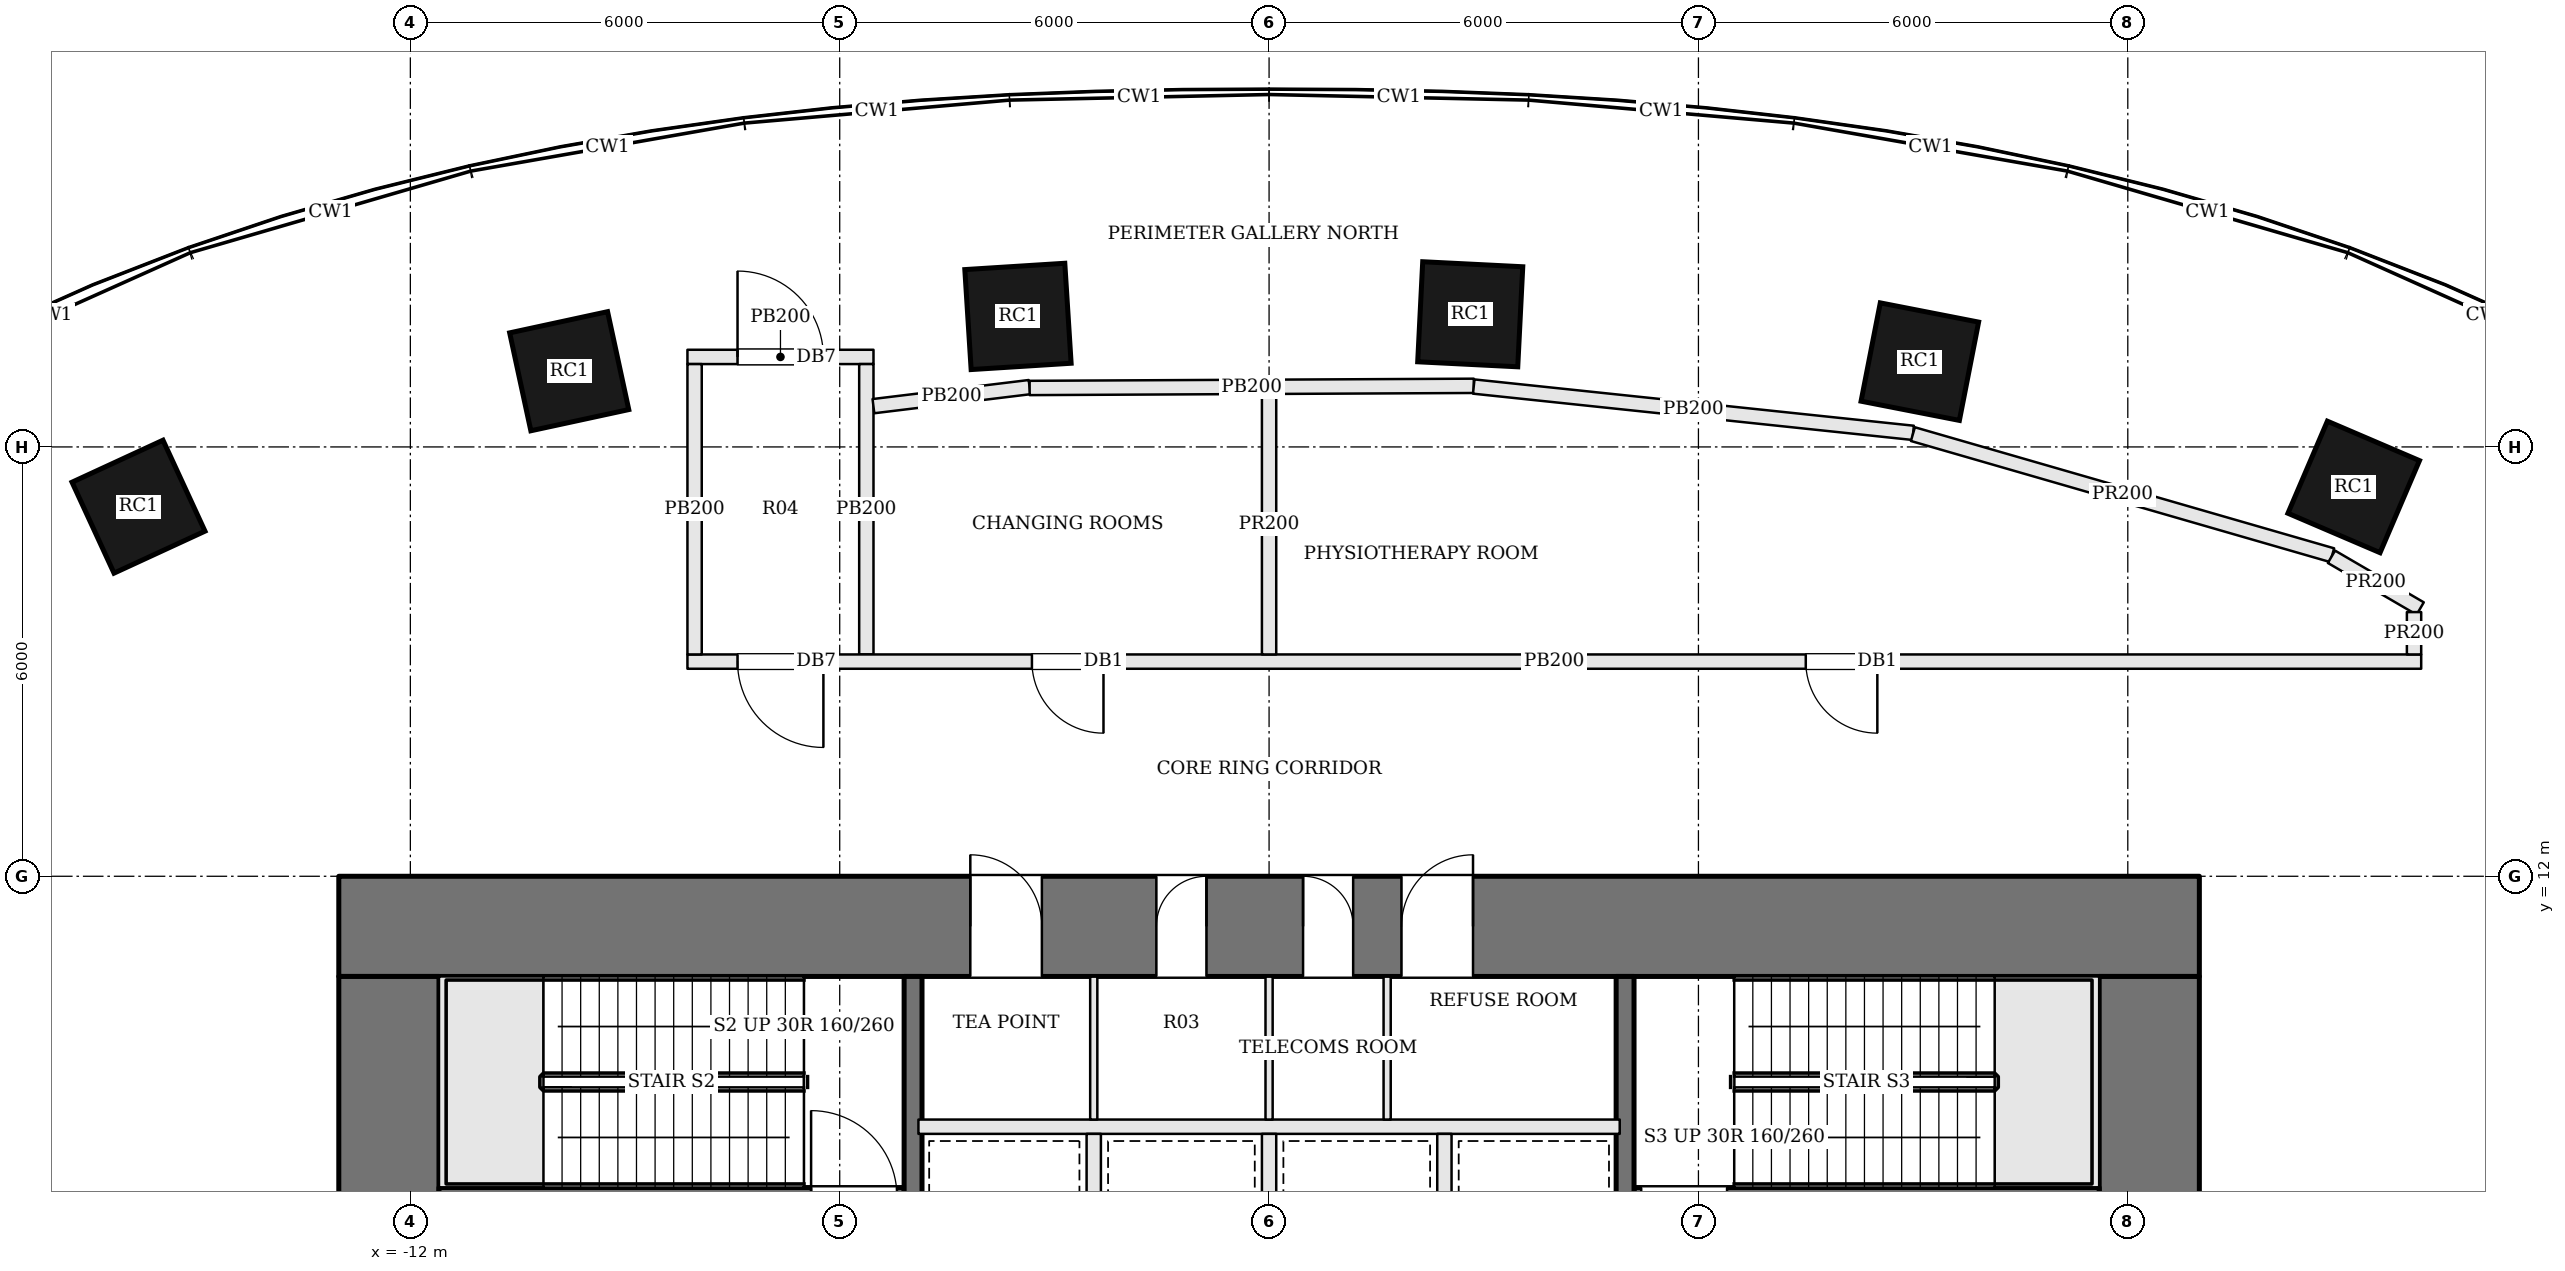
"""IFC4 building model, lengths in metres.
Left out: names, types, materials, properties, quantities, classifications, styles, units other than length and angle.
Written with IfcOpenShell. Run it as: python <this file> out.ifc"""

import sys

from ifc_helpers import new_model, si_unit, direction, frame, frame_2d, origin, origin_2d, place, context, subcontext, project, spatial, rectangle, extrude, element, fill, save


model = new_model("IFC4")
c1 = context("Model", 3, precision=1e-05, world=origin(), true_north=direction((0.0, 1.0)))
c2 = subcontext(c1, "Body", "Model", "MODEL_VIEW")
j1 = project(units=[si_unit("LENGTHUNIT", "METRE"), si_unit("PLANEANGLEUNIT", "RADIAN")], contexts=[c1])
p1 = place(None, origin())
s1 = spatial("IfcSite", under=j1, at=p1, CompositionType="ELEMENT")
p2 = place(p1, origin())
s2 = spatial("IfcBuilding", under=s1, at=p2, CompositionType="ELEMENT")
p3 = place(p2, frame((0.0, 0.0, 28.2)))
s3 = spatial("IfcBuildingStorey", under=s2, at=p3, CompositionType="ELEMENT", Elevation=28.2)
p4 = place(p3, frame((-13.0, 11.3, 0.0), z_axis=(0.0, 0.0, 1.0), x_axis=(1.0, 0.0, 0.0)))
e1 = element("IfcWall", 1, at=p4, inside=s3, PredefinedType="SHEAR", context=c2, shape_type="SweptSolid", body=[
    extrude(rectangle(XDim=26.0, YDim=1.4, at=frame_2d((13.0, 0.0))), origin(), (0.0, 0.0, 1.0), 4.8),
])
p5 = place(p4, frame((8.825, 0.0, 0.0)))
e2 = element("IfcOpeningElement", 2, at=p5, cuts=e1, PredefinedType="OPENING", context=c2, shape_type="SweptSolid", body=[
    extrude(rectangle(XDim=1.0, YDim=2.1, at=frame_2d((0.5, 1.05))), frame((0.0, 0.71, 0.0), z_axis=(0.0, -1.0, 0.0), x_axis=(1.0, 0.0, 0.0)), (0.0, 0.0, 1.0), 1.42),
])
p6 = place(p4, frame((11.425, 0.0, 0.0)))
e3 = element("IfcOpeningElement", 3, at=p6, cuts=e1, PredefinedType="OPENING", context=c2, shape_type="SweptSolid", body=[
    extrude(rectangle(XDim=0.7, YDim=2.1, at=frame_2d((0.35, 1.05))), frame((0.0, 0.71, 0.0), z_axis=(0.0, -1.0, 0.0), x_axis=(1.0, 0.0, 0.0)), (0.0, 0.0, 1.0), 1.42),
])
p7 = place(p4, frame((13.475, 0.0, 0.0)))
e4 = element("IfcOpeningElement", 4, at=p7, cuts=e1, PredefinedType="OPENING", context=c2, shape_type="SweptSolid", body=[
    extrude(rectangle(XDim=0.7, YDim=2.1, at=frame_2d((0.35, 1.05))), frame((0.0, 0.71, 0.0), z_axis=(0.0, -1.0, 0.0), x_axis=(1.0, 0.0, 0.0)), (0.0, 0.0, 1.0), 1.42),
])
p8 = place(p4, frame((14.85, 0.0, 0.0)))
e5 = element("IfcOpeningElement", 5, at=p8, cuts=e1, PredefinedType="OPENING", context=c2, shape_type="SweptSolid", body=[
    extrude(rectangle(XDim=1.0, YDim=2.1, at=frame_2d((0.5, 1.05))), frame((0.0, 0.71, 0.0), z_axis=(0.0, -1.0, 0.0), x_axis=(1.0, 0.0, 0.0)), (0.0, 0.0, 1.0), 1.42),
])
p9 = place(p3, frame((12.3, -1.6, 0.0), z_axis=(0.0, 0.0, 1.0), x_axis=(0.0, 1.0, 0.0)))
e6 = element("IfcWall", 6, at=p9, inside=s3, PredefinedType="SHEAR", context=c2, shape_type="SweptSolid", body=[
    extrude(rectangle(XDim=12.2, YDim=1.4, at=frame_2d((6.1, 0.0))), origin(), (0.0, 0.0, 1.0), 4.8),
])
p10 = place(p9, frame((6.8, 0.0, 0.0)))
e7 = element("IfcOpeningElement", 7, at=p10, cuts=e6, PredefinedType="OPENING", context=c2, shape_type="SweptSolid", body=[
    extrude(rectangle(XDim=1.8, YDim=2.1, at=frame_2d((0.9, 1.05))), frame((0.0, 0.71, 0.0), z_axis=(0.0, -1.0, 0.0), x_axis=(1.0, 0.0, 0.0)), (0.0, 0.0, 1.0), 1.42),
])
p11 = place(p3, frame((-12.3, -1.6, 0.0), z_axis=(0.0, 0.0, 1.0), x_axis=(0.0, 1.0, 0.0)))
e8 = element("IfcWall", 8, at=p11, inside=s3, PredefinedType="SHEAR", context=c2, shape_type="SweptSolid", body=[
    extrude(rectangle(XDim=12.2, YDim=1.4, at=frame_2d((6.1, 0.0))), origin(), (0.0, 0.0, 1.0), 4.8),
])
p12 = place(p11, frame((3.6, 0.0, 0.0)))
e9 = element("IfcOpeningElement", 9, at=p12, cuts=e8, PredefinedType="OPENING", context=c2, shape_type="SweptSolid", body=[
    extrude(rectangle(XDim=1.8, YDim=2.1, at=frame_2d((0.9, 1.05))), frame((0.0, 0.71, 0.0), z_axis=(0.0, -1.0, 0.0), x_axis=(1.0, 0.0, 0.0)), (0.0, 0.0, 1.0), 1.42),
])
for number, where, z_axis, x_axis in (
    (10, (15.157, 17.441, 0.0), (0.0, 0.0, 1.0), (-0.919, 0.394, 0.0)),
    (11, (9.094, 19.192, 0.0), (0.0, 0.0, 1.0), (-0.981, 0.192, 0.0)),
    (12, (2.811, 19.854, 0.0), (0.0, 0.0, 1.0), (-0.999, 0.05, 0.0)),
    (13, (-3.509, 19.824, 0.0), (0.0, 0.0, 1.0), (-0.998, -0.063, 0.0)),
    (14, (-9.78, 19.058, 0.0), (0.0, 0.0, 1.0), (-0.977, -0.211, 0.0)),
    (15, (-15.799, 17.165, 0.0), (0.0, 0.0, 1.0), (-0.908, -0.419, 0.0)),
):
    element("IfcColumn", number, at=place(p3, frame(where, z_axis=z_axis, x_axis=x_axis)), inside=s3, PredefinedType="COLUMN", context=c2, shape_type="SweptSolid", body=[
        extrude(rectangle(XDim=1.4, YDim=1.4, at=origin_2d()), origin(), (0.0, 0.0, 1.0), 4.8),
    ])
p13 = place(p3, frame((11.6, 7.525, 0.0), z_axis=(0.0, 0.0, 1.0), x_axis=(-1.0, 0.0, 0.0)))
e16 = element("IfcWall", 16, at=p13, inside=s3, PredefinedType="SOLIDWALL", context=c2, shape_type="SweptSolid", body=[
    extrude(rectangle(XDim=6.5, YDim=0.25, at=frame_2d((3.25, 0.0))), origin(), (0.0, 0.0, 1.0), 4.5),
])
p14 = place(p13, frame((5.2, 0.0, 0.0)))
e17 = element("IfcOpeningElement", 17, at=p14, cuts=e16, PredefinedType="OPENING", context=c2, shape_type="SweptSolid", body=[
    extrude(rectangle(XDim=1.2, YDim=2.1, at=frame_2d((0.6, 1.05))), frame((0.0, 0.135, 0.0), z_axis=(0.0, -1.0, 0.0), x_axis=(1.0, 0.0, 0.0)), (0.0, 0.0, 1.0), 0.27),
])
p15 = place(p3, frame((-11.6, 7.525, 0.0), z_axis=(0.0, 0.0, 1.0), x_axis=(1.0, 0.0, 0.0)))
e18 = element("IfcWall", 18, at=p15, inside=s3, PredefinedType="SOLIDWALL", context=c2, shape_type="SweptSolid", body=[
    extrude(rectangle(XDim=6.5, YDim=0.25, at=frame_2d((3.25, 0.0))), origin(), (0.0, 0.0, 1.0), 4.5),
])
p16 = place(p15, frame((5.2, 0.0, 0.0)))
e19 = element("IfcOpeningElement", 19, at=p16, cuts=e18, PredefinedType="OPENING", context=c2, shape_type="SweptSolid", body=[
    extrude(rectangle(XDim=1.2, YDim=2.1, at=frame_2d((0.6, 1.05))), frame((0.0, 0.135, 0.0), z_axis=(0.0, -1.0, 0.0), x_axis=(1.0, 0.0, 0.0)), (0.0, 0.0, 1.0), 0.27),
])
p17 = place(p3, frame((-4.975, -1.6, 0.0), z_axis=(0.0, 0.0, 1.0), x_axis=(0.0, 1.0, 0.0)))
e20 = element("IfcWall", 20, at=p17, inside=s3, PredefinedType="SOLIDWALL", context=c2, shape_type="SweptSolid", body=[
    extrude(rectangle(XDim=12.2, YDim=0.25, at=frame_2d((6.1, 0.0))), origin(), (0.0, 0.0, 1.0), 4.5),
])
p18 = place(p17, frame((4.65, 0.0, 0.0)))
e21 = element("IfcOpeningElement", 21, at=p18, cuts=e20, PredefinedType="OPENING", context=c2, shape_type="SweptSolid", body=[
    extrude(rectangle(XDim=1.2, YDim=2.1, at=frame_2d((0.6, 1.05))), frame((0.0, 0.135, 0.0), z_axis=(0.0, -1.0, 0.0), x_axis=(1.0, 0.0, 0.0)), (0.0, 0.0, 1.0), 0.27),
])
p19 = place(p3, frame((4.975, 10.6, 0.0), z_axis=(0.0, 0.0, 1.0), x_axis=(0.0, -1.0, 0.0)))
e22 = element("IfcWall", 22, at=p19, inside=s3, PredefinedType="SOLIDWALL", context=c2, shape_type="SweptSolid", body=[
    extrude(rectangle(XDim=12.2, YDim=0.25, at=frame_2d((6.1, 0.0))), origin(), (0.0, 0.0, 1.0), 4.5),
])
p20 = place(p19, frame((4.65, 0.0, 0.0)))
e23 = element("IfcOpeningElement", 23, at=p20, cuts=e22, PredefinedType="OPENING", context=c2, shape_type="SweptSolid", body=[
    extrude(rectangle(XDim=1.2, YDim=2.1, at=frame_2d((0.6, 1.05))), frame((0.0, 0.135, 0.0), z_axis=(0.0, -1.0, 0.0), x_axis=(1.0, 0.0, 0.0)), (0.0, 0.0, 1.0), 0.27),
])
p21 = place(p3, frame((-4.9, 8.5, 0.0), z_axis=(0.0, 0.0, 1.0), x_axis=(1.0, 0.0, 0.0)))
e24 = element("IfcWall", 24, at=p21, inside=s3, PredefinedType="SOLIDWALL", context=c2, shape_type="SweptSolid", body=[
    extrude(rectangle(XDim=9.8, YDim=0.2, at=frame_2d((4.9, 0.0))), origin(), (0.0, 0.0, 1.0), 4.5),
])
for number, where, z_axis, x_axis in (
    (25, (-2.45, 6.2, 0.0), (0.0, 0.0, 1.0), (0.0, 1.0, 0.0)),
    (26, (0.0, 6.2, 0.0), (0.0, 0.0, 1.0), (0.0, 1.0, 0.0)),
    (27, (2.45, 6.2, 0.0), (0.0, 0.0, 1.0), (0.0, 1.0, 0.0)),
):
    element("IfcWall", number, at=place(p3, frame(where, z_axis=z_axis, x_axis=x_axis)), inside=s3, PredefinedType="SOLIDWALL", context=c2, shape_type="SweptSolid", body=[
        extrude(rectangle(XDim=2.2, YDim=0.2, at=frame_2d((1.1, 0.0))), origin(), (0.0, 0.0, 1.0), 4.5),
    ])
for number, where, z_axis, x_axis in (
    (28, (-2.45, 8.6, 0.0), (0.0, 0.0, 1.0), (0.0, 1.0, 0.0)),
    (29, (0.0, 8.6, 0.0), (0.0, 0.0, 1.0), (0.0, 1.0, 0.0)),
    (30, (1.65, 8.6, 0.0), (0.0, 0.0, 1.0), (0.0, 1.0, 0.0)),
):
    element("IfcWall", number, at=place(p3, frame(where, z_axis=z_axis, x_axis=x_axis)), inside=s3, PredefinedType="PARTITIONING", context=c2, shape_type="SweptSolid", body=[
        extrude(rectangle(XDim=2.0, YDim=0.1, at=frame_2d((1.0, 0.0))), origin(), (0.0, 0.0, 1.0), 4.5),
    ])
p22 = place(p3, frame((-8.128, 19.258, 0.0), z_axis=(0.0, 0.0, 1.0), x_axis=(1.0, 0.0, 0.0)))
e31 = element("IfcWall", 31, at=p22, inside=s3, PredefinedType="PARTITIONING", context=c2, shape_type="SweptSolid", body=[
    extrude(rectangle(XDim=2.6, YDim=0.2, at=frame_2d((1.3, 0.0))), origin(), (0.0, 0.0, 1.0), 3.78),
])
p23 = place(p22, frame((0.7, 0.0, 0.0)))
e32 = element("IfcOpeningElement", 32, at=p23, cuts=e31, PredefinedType="OPENING", context=c2, shape_type="SweptSolid", body=[
    extrude(rectangle(XDim=1.2, YDim=2.1, at=frame_2d((0.6, 1.05))), frame((0.0, 0.11, 0.0), z_axis=(0.0, -1.0, 0.0), x_axis=(1.0, 0.0, 0.0)), (0.0, 0.0, 1.0), 0.22),
])
p24 = place(p3, frame((-5.628, 19.158, 0.0), z_axis=(0.0, 0.0, 1.0), x_axis=(0.0, -1.0, 0.0)))
e33 = element("IfcWall", 33, at=p24, inside=s3, PredefinedType="PARTITIONING", context=c2, shape_type="SweptSolid", body=[
    extrude(rectangle(XDim=4.058, YDim=0.2, at=frame_2d((2.029, 0.0))), origin(), (0.0, 0.0, 1.0), 3.78),
])
p25 = place(p3, frame((16.1, 15.0, 0.0), z_axis=(0.0, 0.0, 1.0), x_axis=(-1.0, 0.0, 0.0)))
e34 = element("IfcWall", 34, at=p25, inside=s3, PredefinedType="PARTITIONING", context=c2, shape_type="SweptSolid", body=[
    extrude(rectangle(XDim=24.228, YDim=0.2, at=frame_2d((12.114, 0.0))), origin(), (0.0, 0.0, 1.0), 3.78),
])
p26 = place(p25, frame((22.328, 0.0, 0.0)))
e35 = element("IfcOpeningElement", 35, at=p26, cuts=e34, PredefinedType="OPENING", context=c2, shape_type="SweptSolid", body=[
    extrude(rectangle(XDim=1.2, YDim=2.1, at=frame_2d((0.6, 1.05))), frame((0.0, 0.11, 0.0), z_axis=(0.0, -1.0, 0.0), x_axis=(1.0, 0.0, 0.0)), (0.0, 0.0, 1.0), 0.22),
])
p27 = place(p25, frame((18.414, 0.0, 0.0)))
e36 = element("IfcOpeningElement", 36, at=p27, cuts=e34, PredefinedType="OPENING", context=c2, shape_type="SweptSolid", body=[
    extrude(rectangle(XDim=1.0, YDim=2.1, at=frame_2d((0.5, 1.05))), frame((0.0, 0.11, 0.0), z_axis=(0.0, -1.0, 0.0), x_axis=(1.0, 0.0, 0.0)), (0.0, 0.0, 1.0), 0.22),
])
p28 = place(p25, frame((7.6, 0.0, 0.0)))
e37 = element("IfcOpeningElement", 37, at=p28, cuts=e34, PredefinedType="OPENING", context=c2, shape_type="SweptSolid", body=[
    extrude(rectangle(XDim=1.0, YDim=2.1, at=frame_2d((0.5, 1.05))), frame((0.0, 0.11, 0.0), z_axis=(0.0, -1.0, 0.0), x_axis=(1.0, 0.0, 0.0)), (0.0, 0.0, 1.0), 0.22),
])
p29 = place(p3, frame((-8.028, 15.1, 0.0), z_axis=(0.0, 0.0, 1.0), x_axis=(0.0, 1.0, 0.0)))
e38 = element("IfcWall", 38, at=p29, inside=s3, PredefinedType="PARTITIONING", context=c2, shape_type="SweptSolid", body=[
    extrude(rectangle(XDim=4.058, YDim=0.2, at=frame_2d((2.029, 0.0))), origin(), (0.0, 0.0, 1.0), 3.78),
])
p30 = place(p3, frame((-5.529, 18.57, 0.0), z_axis=(0.0, 0.0, 1.0), x_axis=(0.992659217013, 0.120944941522, 0.0)))
e39 = element("IfcWall", 39, at=p30, inside=s3, PredefinedType="PARTITIONING", context=c2, shape_type="SweptSolid", body=[
    extrude(rectangle(XDim=2.198, YDim=0.2, at=frame_2d((1.099, 0.0))), origin(), (0.0, 0.0, 1.0), 3.78),
])
p31 = place(p3, frame((-3.346, 18.824, 0.0), z_axis=(0.0, 0.0, 1.0), x_axis=(0.999988297333, 0.004837891778, 0.0)))
e40 = element("IfcWall", 40, at=p31, inside=s3, PredefinedType="PARTITIONING", context=c2, shape_type="SweptSolid", body=[
    extrude(rectangle(XDim=6.207, YDim=0.2, at=frame_2d((3.104, 0.0))), origin(), (0.0, 0.0, 1.0), 3.78),
])
p32 = place(p3, frame((0.0, 18.741, 0.0), z_axis=(0.0, 0.0, 1.0), x_axis=(0.0, -1.0, 0.0)))
e41 = element("IfcWall", 41, at=p32, inside=s3, PredefinedType="PARTITIONING", context=c2, shape_type="SweptSolid", body=[
    extrude(rectangle(XDim=3.641, YDim=0.2, at=frame_2d((1.82, 0.0))), origin(), (0.0, 0.0, 1.0), 3.78),
])
p33 = place(p3, frame((2.86, 18.844, 0.0), z_axis=(0.0, 0.0, 1.0), x_axis=(0.994494179805, -0.10479182379, 0.0)))
e42 = element("IfcWall", 42, at=p33, inside=s3, PredefinedType="PARTITIONING", context=c2, shape_type="SweptSolid", body=[
    extrude(rectangle(XDim=6.174, YDim=0.2, at=frame_2d((3.087, 0.0))), origin(), (0.0, 0.0, 1.0), 3.78),
])
p34 = place(p3, frame((8.997, 18.179, 0.0), z_axis=(0.0, 0.0, 1.0), x_axis=(0.960743591904, -0.277437831982, 0.0)))
e43 = element("IfcWall", 43, at=p34, inside=s3, PredefinedType="PARTITIONING", context=c2, shape_type="SweptSolid", body=[
    extrude(rectangle(XDim=6.098, YDim=0.2, at=frame_2d((3.049, 0.0))), origin(), (0.0, 0.0, 1.0), 3.78),
])
p35 = place(p3, frame((14.846, 16.465, 0.0), z_axis=(0.0, 0.0, 1.0), x_axis=(0.863834413875, -0.503775848375, 0.0)))
e44 = element("IfcWall", 44, at=p35, inside=s3, PredefinedType="PARTITIONING", context=c2, shape_type="SweptSolid", body=[
    extrude(rectangle(XDim=1.436, YDim=0.2, at=frame_2d((0.718, 0.0))), origin(), (0.0, 0.0, 1.0), 3.78),
])
p36 = place(p3, frame((16.0, 15.692, 0.0), z_axis=(0.0, 0.0, 1.0), x_axis=(0.0, -1.0, 0.0)))
e45 = element("IfcWall", 45, at=p36, inside=s3, PredefinedType="PARTITIONING", context=c2, shape_type="SweptSolid", body=[
    extrude(rectangle(XDim=0.592, YDim=0.2, at=frame_2d((0.296, 0.0))), origin(), (0.0, 0.0, 1.0), 3.78),
])
p37 = place(p5, origin())
e46 = element("IfcDoor", 46, at=p37, inside=s3, OperationType="SINGLE_SWING_LEFT", PredefinedType="DOOR", context=c2, shape_type="SweptSolid", body=[
    extrude(rectangle(XDim=1.0, YDim=2.1, at=frame_2d((0.5, 1.05))), frame((0.0, 0.025, 0.0), z_axis=(0.0, -1.0, 0.0), x_axis=(1.0, 0.0, 0.0)), (0.0, 0.0, 1.0), 0.05),
])
fill(e2, e46)
p38 = place(p6, origin())
e47 = element("IfcDoor", 47, at=p38, inside=s3, OperationType="SINGLE_SWING_RIGHT", PredefinedType="DOOR", context=c2, shape_type="SweptSolid", body=[
    extrude(rectangle(XDim=0.7, YDim=2.1, at=frame_2d((0.35, 1.05))), frame((0.0, 0.025, 0.0), z_axis=(0.0, -1.0, 0.0), x_axis=(1.0, 0.0, 0.0)), (0.0, 0.0, 1.0), 0.05),
])
fill(e3, e47)
p39 = place(p7, origin())
e48 = element("IfcDoor", 48, at=p39, inside=s3, OperationType="SINGLE_SWING_LEFT", PredefinedType="DOOR", context=c2, shape_type="SweptSolid", body=[
    extrude(rectangle(XDim=0.7, YDim=2.1, at=frame_2d((0.35, 1.05))), frame((0.0, 0.025, 0.0), z_axis=(0.0, -1.0, 0.0), x_axis=(1.0, 0.0, 0.0)), (0.0, 0.0, 1.0), 0.05),
])
fill(e4, e48)
p40 = place(p8, origin())
e49 = element("IfcDoor", 49, at=p40, inside=s3, OperationType="SINGLE_SWING_RIGHT", PredefinedType="DOOR", context=c2, shape_type="SweptSolid", body=[
    extrude(rectangle(XDim=1.0, YDim=2.1, at=frame_2d((0.5, 1.05))), frame((0.0, 0.025, 0.0), z_axis=(0.0, -1.0, 0.0), x_axis=(1.0, 0.0, 0.0)), (0.0, 0.0, 1.0), 0.05),
])
fill(e5, e49)
p41 = place(p26, origin())
e50 = element("IfcDoor", 50, at=p41, inside=s3, OperationType="SINGLE_SWING_LEFT", PredefinedType="DOOR", context=c2, shape_type="SweptSolid", body=[
    extrude(rectangle(XDim=1.2, YDim=2.1, at=frame_2d((0.6, 1.05))), frame((0.0, 0.025, 0.0), z_axis=(0.0, -1.0, 0.0), x_axis=(1.0, 0.0, 0.0)), (0.0, 0.0, 1.0), 0.05),
])
fill(e35, e50)
p42 = place(p23, origin())
e51 = element("IfcDoor", 51, at=p42, inside=s3, OperationType="SINGLE_SWING_LEFT", PredefinedType="DOOR", context=c2, shape_type="SweptSolid", body=[
    extrude(rectangle(XDim=1.2, YDim=2.1, at=frame_2d((0.6, 1.05))), frame((0.0, 0.025, 0.0), z_axis=(0.0, -1.0, 0.0), x_axis=(1.0, 0.0, 0.0)), (0.0, 0.0, 1.0), 0.05),
])
fill(e32, e51)
p43 = place(p27, origin())
e52 = element("IfcDoor", 52, at=p43, inside=s3, OperationType="SINGLE_SWING_LEFT", PredefinedType="DOOR", context=c2, shape_type="SweptSolid", body=[
    extrude(rectangle(XDim=1.0, YDim=2.1, at=frame_2d((0.5, 1.05))), frame((0.0, 0.025, 0.0), z_axis=(0.0, -1.0, 0.0), x_axis=(1.0, 0.0, 0.0)), (0.0, 0.0, 1.0), 0.05),
])
fill(e36, e52)
p44 = place(p28, origin())
e53 = element("IfcDoor", 53, at=p44, inside=s3, OperationType="SINGLE_SWING_LEFT", PredefinedType="DOOR", context=c2, shape_type="SweptSolid", body=[
    extrude(rectangle(XDim=1.0, YDim=2.1, at=frame_2d((0.5, 1.05))), frame((0.0, 0.025, 0.0), z_axis=(0.0, -1.0, 0.0), x_axis=(1.0, 0.0, 0.0)), (0.0, 0.0, 1.0), 0.05),
])
fill(e37, e53)
save(model, sys.argv[1])
